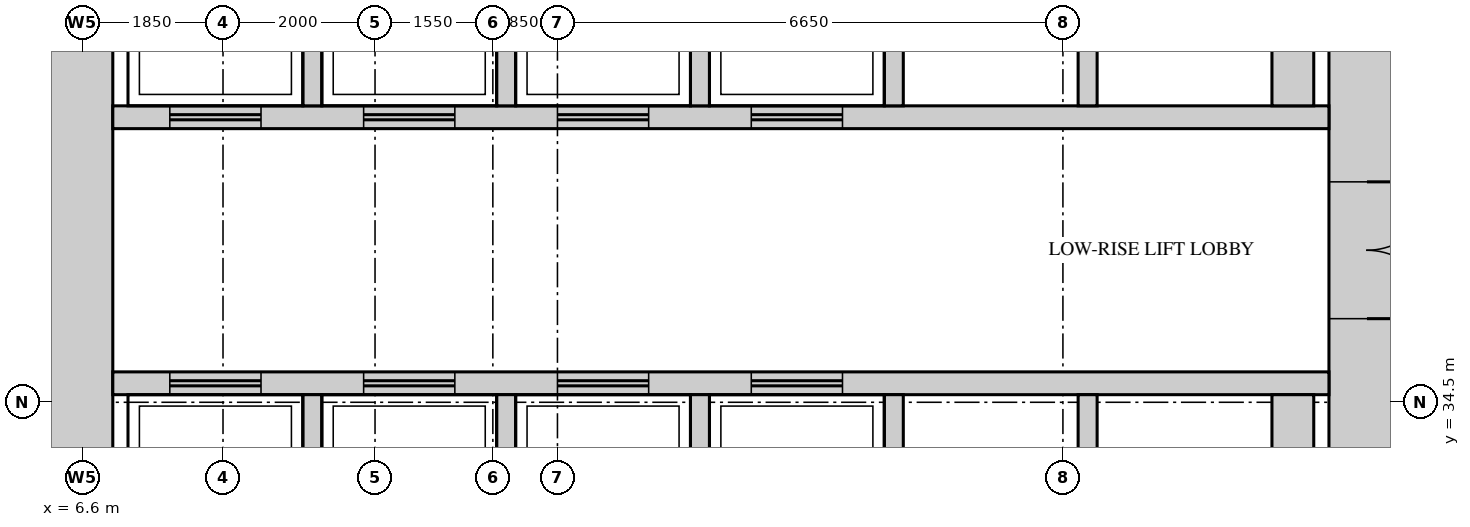
"""IFC4 building model, lengths in metres.
Left out: names, types, materials, properties, quantities, classifications, styles, units other than length and angle.
Written with IfcOpenShell. Run it as: python <this file> out.ifc"""

import sys

from ifc_helpers import new_model, si_unit, direction, frame, frame_2d, origin, place, context, subcontext, project, spatial, rectangle, extrude, source, transform, mapped, element, fill, save


model = new_model("IFC4")
c1 = context("Model", 3, precision=1e-05, world=origin(), true_north=direction((0.0, 1.0)))
c2 = subcontext(c1, "Body", "Model", "MODEL_VIEW")
j1 = project(units=[si_unit("LENGTHUNIT", "METRE"), si_unit("PLANEANGLEUNIT", "RADIAN")], contexts=[c1])
p1 = place(None, origin())
s1 = spatial("IfcSite", under=j1, at=p1, CompositionType="ELEMENT")
p2 = place(p1, origin())
s2 = spatial("IfcBuilding", under=s1, at=p2, CompositionType="ELEMENT")
p3 = place(p2, frame((0.0, 0.0, 141.1)))
s3 = spatial("IfcBuildingStorey", under=s2, at=p3, CompositionType="ELEMENT", Elevation=141.1)
m1 = source(origin(), c2, "Body", "SweptSolid", [
    extrude(rectangle(XDim=28.0, YDim=1.0, at=frame_2d((14.0, 0.0))), origin(), (0.0, 0.0, 1.0), 4.1),
])
p4 = place(p3, frame((23.5, 13.0, 0.0), z_axis=(0.0, 0.0, 1.0), x_axis=(0.0, 1.0, 0.0)))
e1 = element("IfcWall", 1, at=p4, inside=s3, PredefinedType="SHEAR", context=c2, shape_type="MappedRepresentation", body=[
    mapped(m1, transform((0.0, 0.0, 0.0))),
])
m2 = source(origin(), c2, "Body", "SweptSolid", [
    extrude(rectangle(XDim=1.8, YDim=2.1, at=frame_2d((0.9, 1.05))), frame((0.0, 0.51, 0.0), z_axis=(0.0, -1.0, 0.0), x_axis=(1.0, 0.0, 0.0)), (0.0, 0.0, 1.0), 1.02),
])
p5 = place(p4, frame((22.6, 0.0, 0.0)))
e2 = element("IfcOpeningElement", 2, at=p5, cuts=e1, PredefinedType="OPENING", context=c2, shape_type="MappedRepresentation", body=[
    mapped(m2, transform((0.0, 0.0, 0.0))),
])
m3 = source(origin(), c2, "Body", "SweptSolid", [
    extrude(rectangle(XDim=1.2, YDim=2.1, at=frame_2d((0.6, 1.05))), frame((0.0, 0.51, 0.0), z_axis=(0.0, -1.0, 0.0), x_axis=(1.0, 0.0, 0.0)), (0.0, 0.0, 1.0), 1.02),
])
p6 = place(p4, frame((12.35, 0.0, 0.0)))
e3 = element("IfcOpeningElement", 3, at=p6, cuts=e1, PredefinedType="OPENING", context=c2, shape_type="MappedRepresentation", body=[
    mapped(m3, transform((0.0, 0.0, 0.0))),
])
m4 = source(origin(), c2, "Body", "SweptSolid", [
    extrude(rectangle(XDim=0.9, YDim=2.1, at=frame_2d((0.45, 1.05))), frame((0.0, 0.51, 0.0), z_axis=(0.0, -1.0, 0.0), x_axis=(1.0, 0.0, 0.0)), (0.0, 0.0, 1.0), 1.02),
])
p7 = place(p4, frame((4.6, 0.0, 0.0)))
e4 = element("IfcOpeningElement", 4, at=p7, cuts=e1, PredefinedType="OPENING", context=c2, shape_type="MappedRepresentation", body=[
    mapped(m4, transform((0.0, 0.0, 0.0))),
])
p8 = place(p3, frame((6.5, 13.0, 0.0), z_axis=(0.0, 0.0, 1.0), x_axis=(0.0, 1.0, 0.0)))
e5 = element("IfcWall", 5, at=p8, inside=s3, PredefinedType="SHEAR", context=c2, shape_type="MappedRepresentation", body=[
    mapped(m1, transform((0.0, 0.0, 0.0))),
])
m5 = source(origin(), c2, "Body", "SweptSolid", [
    extrude(rectangle(XDim=16.0, YDim=0.3, at=frame_2d((8.0, 0.0))), origin(), (0.0, 0.0, 1.0), 4.1),
])
p9 = place(p3, frame((7.0, 38.25, 0.0), z_axis=(0.0, 0.0, 1.0), x_axis=(1.0, 0.0, 0.0)))
e6 = element("IfcWall", 6, at=p9, inside=s3, PredefinedType="STANDARD", context=c2, shape_type="MappedRepresentation", body=[
    mapped(m5, transform((0.0, 0.0, 0.0))),
])
m6 = source(origin(), c2, "Body", "SweptSolid", [
    extrude(rectangle(XDim=1.2, YDim=2.1, at=frame_2d((0.6, 1.05))), frame((0.0, 0.16, 0.0), z_axis=(0.0, -1.0, 0.0), x_axis=(1.0, 0.0, 0.0)), (0.0, 0.0, 1.0), 0.32),
])
p10 = place(p9, frame((0.75, 0.0, 0.0)))
e7 = element("IfcOpeningElement", 7, at=p10, cuts=e6, PredefinedType="OPENING", context=c2, shape_type="MappedRepresentation", body=[
    mapped(m6, transform((0.0, 0.0, 0.0))),
])
p11 = place(p9, frame((3.3, 0.0, 0.0)))
e8 = element("IfcOpeningElement", 8, at=p11, cuts=e6, PredefinedType="OPENING", context=c2, shape_type="MappedRepresentation", body=[
    mapped(m6, transform((0.0, 0.0, 0.0))),
])
p12 = place(p9, frame((5.85, 0.0, 0.0)))
e9 = element("IfcOpeningElement", 9, at=p12, cuts=e6, PredefinedType="OPENING", context=c2, shape_type="MappedRepresentation", body=[
    mapped(m6, transform((0.0, 0.0, 0.0))),
])
p13 = place(p9, frame((8.4, 0.0, 0.0)))
e10 = element("IfcOpeningElement", 10, at=p13, cuts=e6, PredefinedType="OPENING", context=c2, shape_type="MappedRepresentation", body=[
    mapped(m6, transform((0.0, 0.0, 0.0))),
])
p14 = place(p3, frame((7.0, 34.75, 0.0), z_axis=(0.0, 0.0, 1.0), x_axis=(1.0, 0.0, 0.0)))
e11 = element("IfcWall", 11, at=p14, inside=s3, PredefinedType="STANDARD", context=c2, shape_type="MappedRepresentation", body=[
    mapped(m5, transform((0.0, 0.0, 0.0))),
])
p15 = place(p14, frame((0.75, 0.0, 0.0)))
e12 = element("IfcOpeningElement", 12, at=p15, cuts=e11, PredefinedType="OPENING", context=c2, shape_type="MappedRepresentation", body=[
    mapped(m6, transform((0.0, 0.0, 0.0))),
])
p16 = place(p14, frame((3.3, 0.0, 0.0)))
e13 = element("IfcOpeningElement", 13, at=p16, cuts=e11, PredefinedType="OPENING", context=c2, shape_type="MappedRepresentation", body=[
    mapped(m6, transform((0.0, 0.0, 0.0))),
])
p17 = place(p14, frame((5.85, 0.0, 0.0)))
e14 = element("IfcOpeningElement", 14, at=p17, cuts=e11, PredefinedType="OPENING", context=c2, shape_type="MappedRepresentation", body=[
    mapped(m6, transform((0.0, 0.0, 0.0))),
])
p18 = place(p14, frame((8.4, 0.0, 0.0)))
e15 = element("IfcOpeningElement", 15, at=p18, cuts=e11, PredefinedType="OPENING", context=c2, shape_type="MappedRepresentation", body=[
    mapped(m6, transform((0.0, 0.0, 0.0))),
])
m7 = source(origin(), c2, "Body", "SweptSolid", [
    extrude(rectangle(XDim=2.6, YDim=0.25, at=frame_2d((1.3, 0.0))), origin(), (0.0, 0.0, 1.0), 4.1),
])
for number, where, z_axis, x_axis in (
    (16, (9.625, 38.4, 0.0), (0.0, 0.0, 1.0), (0.0, 1.0, 0.0)),
    (17, (12.175, 38.4, 0.0), (0.0, 0.0, 1.0), (0.0, 1.0, 0.0)),
    (18, (14.725, 38.4, 0.0), (0.0, 0.0, 1.0), (0.0, 1.0, 0.0)),
    (19, (17.275, 38.4, 0.0), (0.0, 0.0, 1.0), (0.0, 1.0, 0.0)),
    (20, (19.825, 38.4, 0.0), (0.0, 0.0, 1.0), (0.0, 1.0, 0.0)),
):
    element("IfcWall", number, at=place(p3, frame(where, z_axis=z_axis, x_axis=x_axis)), inside=s3, PredefinedType="STANDARD", context=c2, shape_type="MappedRepresentation", body=[
        mapped(m7, transform((0.0, 0.0, 0.0))),
    ])
m8 = source(origin(), c2, "Body", "SweptSolid", [
    extrude(rectangle(XDim=2.6, YDim=0.55, at=frame_2d((1.3, 0.0))), origin(), (0.0, 0.0, 1.0), 4.1),
])
p19 = place(p3, frame((22.525, 38.4, 0.0), z_axis=(0.0, 0.0, 1.0), x_axis=(0.0, 1.0, 0.0)))
e21 = element("IfcWall", 21, at=p19, inside=s3, PredefinedType="STANDARD", context=c2, shape_type="MappedRepresentation", body=[
    mapped(m8, transform((0.0, 0.0, 0.0))),
])
m9 = source(origin(), c2, "Body", "SweptSolid", [
    extrude(rectangle(XDim=2.4, YDim=0.25, at=frame_2d((1.2, 0.0))), origin(), (0.0, 0.0, 1.0), 4.1),
])
for number, where, z_axis, x_axis in (
    (22, (9.625, 32.2, 0.0), (0.0, 0.0, 1.0), (0.0, 1.0, 0.0)),
    (23, (12.175, 32.2, 0.0), (0.0, 0.0, 1.0), (0.0, 1.0, 0.0)),
    (24, (14.725, 32.2, 0.0), (0.0, 0.0, 1.0), (0.0, 1.0, 0.0)),
    (25, (17.275, 32.2, 0.0), (0.0, 0.0, 1.0), (0.0, 1.0, 0.0)),
    (26, (19.825, 32.2, 0.0), (0.0, 0.0, 1.0), (0.0, 1.0, 0.0)),
):
    element("IfcWall", number, at=place(p3, frame(where, z_axis=z_axis, x_axis=x_axis)), inside=s3, PredefinedType="STANDARD", context=c2, shape_type="MappedRepresentation", body=[
        mapped(m9, transform((0.0, 0.0, 0.0))),
    ])
m10 = source(origin(), c2, "Body", "SweptSolid", [
    extrude(rectangle(XDim=2.4, YDim=0.55, at=frame_2d((1.2, 0.0))), origin(), (0.0, 0.0, 1.0), 4.1),
])
p20 = place(p3, frame((22.525, 32.2, 0.0), z_axis=(0.0, 0.0, 1.0), x_axis=(0.0, 1.0, 0.0)))
e27 = element("IfcWall", 27, at=p20, inside=s3, PredefinedType="STANDARD", context=c2, shape_type="MappedRepresentation", body=[
    mapped(m10, transform((0.0, 0.0, 0.0))),
])
m11 = source(origin(), c2, "Body", "SweptSolid", [
    extrude(rectangle(XDim=1.8, YDim=2.1, at=frame_2d((0.9, 1.05))), frame((0.0, 0.45, 0.0), z_axis=(0.0, -1.0, 0.0), x_axis=(1.0, 0.0, 0.0)), (0.0, 0.0, 1.0), 0.9),
])
p21 = place(p5, origin())
e28 = element("IfcDoor", 28, at=p21, inside=s3, OperationType="DOUBLE_DOOR_SINGLE_SWING", PredefinedType="DOOR", context=c2, shape_type="MappedRepresentation", body=[
    mapped(m11, transform((0.0, 0.0, 0.0))),
])
fill(e2, e28)
m12 = source(origin(), c2, "Body", "SweptSolid", [
    extrude(rectangle(XDim=1.2, YDim=2.1, at=frame_2d((0.6, 1.05))), frame((0.0, 0.025, 0.0), z_axis=(0.0, -1.0, 0.0), x_axis=(1.0, 0.0, 0.0)), (0.0, 0.0, 1.0), 0.05),
])
p22 = place(p15, origin())
e29 = element("IfcDoor", 29, at=p22, inside=s3, OperationType="DOUBLE_DOOR_SLIDING", PredefinedType="DOOR", context=c2, shape_type="MappedRepresentation", body=[
    mapped(m12, transform((0.0, 0.0, 0.0))),
])
fill(e12, e29)
p23 = place(p16, origin())
e30 = element("IfcDoor", 30, at=p23, inside=s3, OperationType="DOUBLE_DOOR_SLIDING", PredefinedType="DOOR", context=c2, shape_type="MappedRepresentation", body=[
    mapped(m12, transform((0.0, 0.0, 0.0))),
])
fill(e13, e30)
p24 = place(p17, origin())
e31 = element("IfcDoor", 31, at=p24, inside=s3, OperationType="DOUBLE_DOOR_SLIDING", PredefinedType="DOOR", context=c2, shape_type="MappedRepresentation", body=[
    mapped(m12, transform((0.0, 0.0, 0.0))),
])
fill(e14, e31)
p25 = place(p18, origin())
e32 = element("IfcDoor", 32, at=p25, inside=s3, OperationType="DOUBLE_DOOR_SLIDING", PredefinedType="DOOR", context=c2, shape_type="MappedRepresentation", body=[
    mapped(m12, transform((0.0, 0.0, 0.0))),
])
fill(e15, e32)
p26 = place(p10, origin())
e33 = element("IfcDoor", 33, at=p26, inside=s3, OperationType="DOUBLE_DOOR_SLIDING", PredefinedType="DOOR", context=c2, shape_type="MappedRepresentation", body=[
    mapped(m12, transform((0.0, 0.0, 0.0))),
])
fill(e7, e33)
p27 = place(p11, origin())
e34 = element("IfcDoor", 34, at=p27, inside=s3, OperationType="DOUBLE_DOOR_SLIDING", PredefinedType="DOOR", context=c2, shape_type="MappedRepresentation", body=[
    mapped(m12, transform((0.0, 0.0, 0.0))),
])
fill(e8, e34)
p28 = place(p12, origin())
e35 = element("IfcDoor", 35, at=p28, inside=s3, OperationType="DOUBLE_DOOR_SLIDING", PredefinedType="DOOR", context=c2, shape_type="MappedRepresentation", body=[
    mapped(m12, transform((0.0, 0.0, 0.0))),
])
fill(e9, e35)
p29 = place(p13, origin())
e36 = element("IfcDoor", 36, at=p29, inside=s3, OperationType="DOUBLE_DOOR_SLIDING", PredefinedType="DOOR", context=c2, shape_type="MappedRepresentation", body=[
    mapped(m12, transform((0.0, 0.0, 0.0))),
])
fill(e10, e36)
save(model, sys.argv[1])
